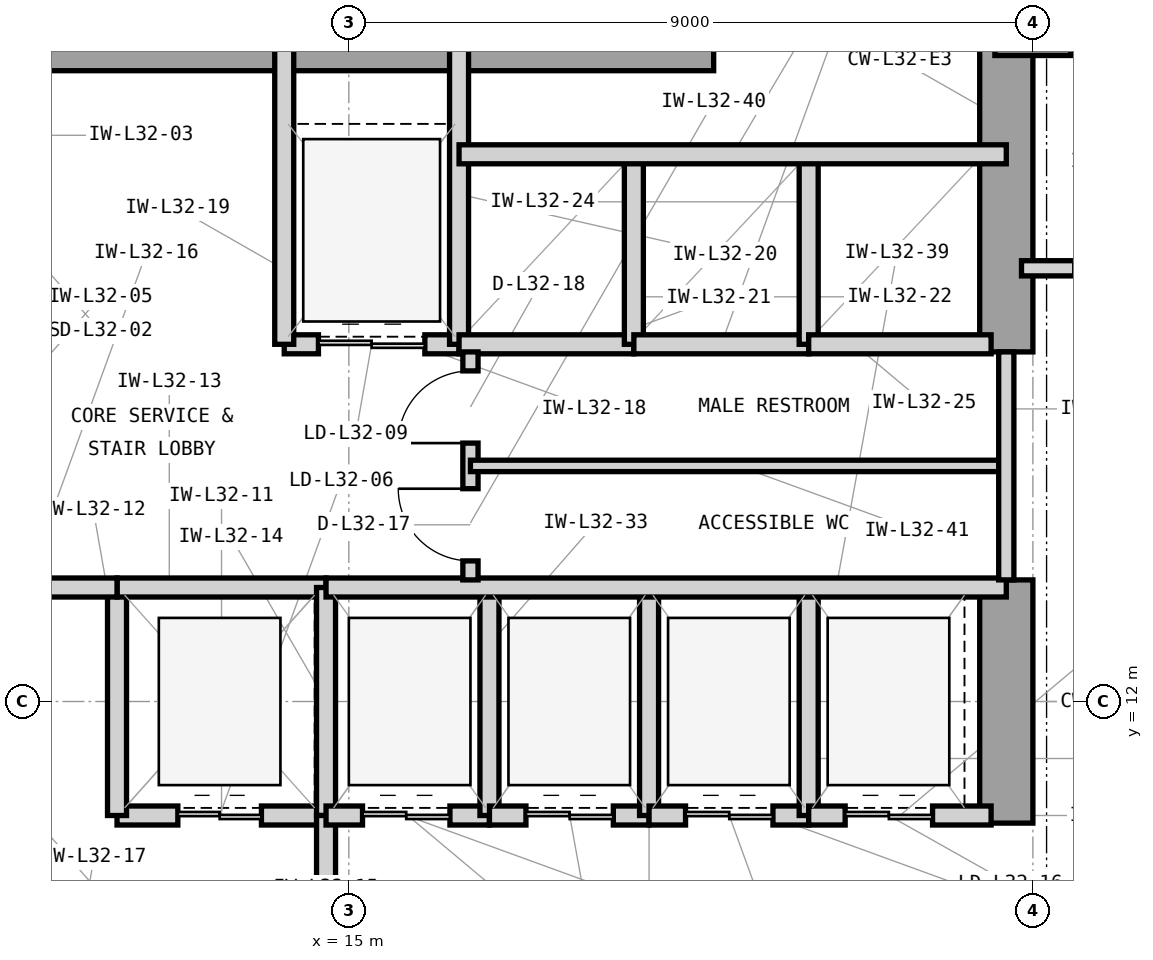
"""IFC4 building model, lengths in metres.
Left out: names, types, materials, properties, quantities, classifications, styles, units other than length and angle.
Written with IfcOpenShell. Run it as: python <this file> out.ifc"""

import sys

from ifc_helpers import new_model, si_unit, direction, frame, frame_2d, origin, origin_2d, place, context, subcontext, project, spatial, rectangle, extrude, element, fill, save


model = new_model("IFC4")
c1 = context("Model", 3, precision=1e-05, world=origin(), true_north=direction((0.0, 1.0)))
c2 = subcontext(c1, "Body", "Model", "MODEL_VIEW")
j1 = project(units=[si_unit("LENGTHUNIT", "METRE"), si_unit("PLANEANGLEUNIT", "RADIAN")], contexts=[c1])
p1 = place(None, origin())
s1 = spatial("IfcSite", under=j1, at=p1, CompositionType="ELEMENT")
p2 = place(p1, origin())
s2 = spatial("IfcBuilding", under=s1, at=p2, CompositionType="ELEMENT")
p3 = place(p2, frame((0.0, 0.0, 136.2)))
s3 = spatial("IfcBuildingStorey", under=s2, at=p3, CompositionType="ELEMENT", Elevation=136.2)
p4 = place(p3, frame((7.475, 20.65, 0.0), z_axis=(0.0, 0.0, 1.0), x_axis=(1.0, 0.0, 0.0)))
e1 = element("IfcWall", 1, at=p4, inside=s3, PredefinedType="SHEAR", context=c2, shape_type="SweptSolid", body=[
    extrude(rectangle(XDim=12.325, YDim=0.7, at=frame_2d((6.163, 0.0))), origin(), (0.0, 0.0, 1.0), 3.9),
])
p5 = place(p3, frame((23.65, 10.4, 0.0), z_axis=(0.0, 0.0, 1.0), x_axis=(0.0, 1.0, 0.0)))
e2 = element("IfcWall", 2, at=p5, inside=s3, PredefinedType="SHEAR", context=c2, shape_type="SweptSolid", body=[
    extrude(rectangle(XDim=3.2, YDim=0.7, at=frame_2d((1.6, 0.0))), origin(), (0.0, 0.0, 1.0), 3.9),
])
p6 = place(p3, frame((23.65, 16.6, 0.0), z_axis=(0.0, 0.0, 1.0), x_axis=(0.0, 1.0, 0.0)))
e3 = element("IfcWall", 3, at=p6, inside=s3, PredefinedType="SHEAR", context=c2, shape_type="SweptSolid", body=[
    extrude(rectangle(XDim=4.05, YDim=0.7, at=frame_2d((2.025, 0.0))), origin(), (0.0, 0.0, 1.0), 3.9),
])
p7 = place(p3, frame((24.0, 21.0, 0.0), z_axis=(0.0, 0.0, 1.0), x_axis=(1.0, 0.0, 0.0)))
e4 = element("IfcColumn", 4, at=p7, inside=s3, PredefinedType="COLUMN", context=c2, shape_type="SweptSolid", body=[
    extrude(rectangle(XDim=1.0, YDim=1.0, at=origin_2d()), origin(), (0.0, 0.0, 1.0), 3.9),
])
p8 = place(p3, frame((11.95, 10.5, 0.0), z_axis=(0.0, 0.0, 1.0), x_axis=(1.0, 0.0, 0.0)))
e5 = element("IfcWall", 5, at=p8, inside=s3, PredefinedType="PARTITIONING", context=c2, shape_type="SweptSolid", body=[
    extrude(rectangle(XDim=2.75, YDim=0.25, at=frame_2d((1.375, 0.0))), origin(), (0.0, 0.0, 1.0), 3.233),
])
p9 = place(p8, frame((0.8, 0.0, 0.0)))
e6 = element("IfcOpeningElement", 6, at=p9, cuts=e5, PredefinedType="OPENING", context=c2, shape_type="SweptSolid", body=[
    extrude(rectangle(XDim=1.1, YDim=2.25, at=frame_2d((0.55, 1.125))), frame((0.0, 0.135, 0.0), z_axis=(0.0, -1.0, 0.0), x_axis=(1.0, 0.0, 0.0)), (0.0, 0.0, 1.0), 0.27),
])
p10 = place(p3, frame((11.95, 10.5, 0.0), z_axis=(0.0, 0.0, 1.0), x_axis=(0.0, 1.0, 0.0)))
e7 = element("IfcWall", 7, at=p10, inside=s3, PredefinedType="PARTITIONING", context=c2, shape_type="SweptSolid", body=[
    extrude(rectangle(XDim=3.0, YDim=0.25, at=frame_2d((1.5, 0.0))), origin(), (0.0, 0.0, 1.0), 3.69),
])
p11 = place(p3, frame((11.95, 13.5, 0.0), z_axis=(0.0, 0.0, 1.0), x_axis=(1.0, 0.0, 0.0)))
e8 = element("IfcWall", 8, at=p11, inside=s3, PredefinedType="PARTITIONING", context=c2, shape_type="SweptSolid", body=[
    extrude(rectangle(XDim=2.75, YDim=0.25, at=frame_2d((1.375, 0.0))), origin(), (0.0, 0.0, 1.0), 3.233),
])
p12 = place(p3, frame((14.7, 10.5, 0.0), z_axis=(0.0, 0.0, 1.0), x_axis=(0.0, 1.0, 0.0)))
e9 = element("IfcWall", 9, at=p12, inside=s3, PredefinedType="PARTITIONING", context=c2, shape_type="SweptSolid", body=[
    extrude(rectangle(XDim=3.0, YDim=0.25, at=frame_2d((1.5, 0.0))), origin(), (0.0, 0.0, 1.0), 3.69),
])
p13 = place(p3, frame((14.7, 6.7, 0.0), z_axis=(0.0, 0.0, 1.0), x_axis=(0.0, 1.0, 0.0)))
e10 = element("IfcWall", 10, at=p13, inside=s3, PredefinedType="PARTITIONING", context=c2, shape_type="SweptSolid", body=[
    extrude(rectangle(XDim=3.8, YDim=0.25, at=frame_2d((1.9, 0.0))), origin(), (0.0, 0.0, 1.0), 3.69),
])
p14 = place(p13, frame((1.3, 0.0, 0.0)))
e11 = element("IfcOpeningElement", 11, at=p14, cuts=e10, PredefinedType="OPENING", context=c2, shape_type="SweptSolid", body=[
    extrude(rectangle(XDim=1.2, YDim=2.2, at=frame_2d((0.6, 1.1))), frame((0.0, 0.135, 0.0), z_axis=(0.0, -1.0, 0.0), x_axis=(1.0, 0.0, 0.0)), (0.0, 0.0, 1.0), 0.27),
])
p15 = place(p3, frame((10.33, 13.5, 0.0), z_axis=(0.0, 0.0, 1.0), x_axis=(1.0, 0.0, 0.0)))
e12 = element("IfcWall", 12, at=p15, inside=s3, PredefinedType="PARTITIONING", context=c2, shape_type="SweptSolid", body=[
    extrude(rectangle(XDim=1.62, YDim=0.25, at=frame_2d((0.81, 0.0))), origin(), (0.0, 0.0, 1.0), 3.233),
])
p16 = place(p3, frame((14.15, 16.7, 0.0), z_axis=(0.0, 0.0, 1.0), x_axis=(1.0, 0.0, 0.0)))
e13 = element("IfcWall", 13, at=p16, inside=s3, PredefinedType="PARTITIONING", context=c2, shape_type="SweptSolid", body=[
    extrude(rectangle(XDim=2.3, YDim=0.25, at=frame_2d((1.15, 0.0))), origin(), (0.0, 0.0, 1.0), 3.233),
])
p17 = place(p16, frame((0.45, 0.0, 0.0)))
e14 = element("IfcOpeningElement", 14, at=p17, cuts=e13, PredefinedType="OPENING", context=c2, shape_type="SweptSolid", body=[
    extrude(rectangle(XDim=1.4, YDim=2.35, at=frame_2d((0.7, 1.175))), frame((0.0, 0.135, 0.0), z_axis=(0.0, -1.0, 0.0), x_axis=(1.0, 0.0, 0.0)), (0.0, 0.0, 1.0), 0.27),
])
for number, where, z_axis, x_axis in (
    (15, (14.15, 16.7, 0.0), (0.0, 0.0, 1.0), (0.0, 1.0, 0.0)),
    (16, (16.45, 16.7, 0.0), (0.0, 0.0, 1.0), (0.0, 1.0, 0.0)),
):
    element("IfcWall", number, at=place(p3, frame(where, z_axis=z_axis, x_axis=x_axis)), inside=s3, PredefinedType="PARTITIONING", context=c2, shape_type="SweptSolid", body=[
        extrude(rectangle(XDim=3.95, YDim=0.25, at=frame_2d((1.975, 0.0))), origin(), (0.0, 0.0, 1.0), 3.69),
    ])
p18 = place(p3, frame((16.45, 16.7, 0.0), z_axis=(0.0, 0.0, 1.0), x_axis=(1.0, 0.0, 0.0)))
e17 = element("IfcWall", 17, at=p18, inside=s3, PredefinedType="PARTITIONING", context=c2, shape_type="SweptSolid", body=[
    extrude(rectangle(XDim=2.3, YDim=0.25, at=frame_2d((1.15, 0.0))), origin(), (0.0, 0.0, 1.0), 3.233),
])
p19 = place(p3, frame((18.75, 16.7, 0.0), z_axis=(0.0, 0.0, 1.0), x_axis=(0.0, 1.0, 0.0)))
e18 = element("IfcWall", 18, at=p19, inside=s3, PredefinedType="PARTITIONING", context=c2, shape_type="SweptSolid", body=[
    extrude(rectangle(XDim=2.5, YDim=0.25, at=frame_2d((1.25, 0.0))), origin(), (0.0, 0.0, 1.0), 3.69),
])
p20 = place(p3, frame((18.75, 16.7, 0.0), z_axis=(0.0, 0.0, 1.0), x_axis=(1.0, 0.0, 0.0)))
e19 = element("IfcWall", 19, at=p20, inside=s3, PredefinedType="PARTITIONING", context=c2, shape_type="SweptSolid", body=[
    extrude(rectangle(XDim=2.3, YDim=0.25, at=frame_2d((1.15, 0.0))), origin(), (0.0, 0.0, 1.0), 3.233),
])
p21 = place(p3, frame((21.05, 16.7, 0.0), z_axis=(0.0, 0.0, 1.0), x_axis=(0.0, 1.0, 0.0)))
e20 = element("IfcWall", 20, at=p21, inside=s3, PredefinedType="PARTITIONING", context=c2, shape_type="SweptSolid", body=[
    extrude(rectangle(XDim=2.5, YDim=0.25, at=frame_2d((1.25, 0.0))), origin(), (0.0, 0.0, 1.0), 3.69),
])
p22 = place(p3, frame((21.05, 16.7, 0.0), z_axis=(0.0, 0.0, 1.0), x_axis=(1.0, 0.0, 0.0)))
e21 = element("IfcWall", 21, at=p22, inside=s3, PredefinedType="PARTITIONING", context=c2, shape_type="SweptSolid", body=[
    extrude(rectangle(XDim=2.4, YDim=0.25, at=frame_2d((1.2, 0.0))), origin(), (0.0, 0.0, 1.0), 3.233),
])
p23 = place(p3, frame((16.45, 19.2, 0.0), z_axis=(0.0, 0.0, 1.0), x_axis=(1.0, 0.0, 0.0)))
e22 = element("IfcWall", 22, at=p23, inside=s3, PredefinedType="PARTITIONING", context=c2, shape_type="SweptSolid", body=[
    extrude(rectangle(XDim=7.2, YDim=0.25, at=frame_2d((3.6, 0.0))), origin(), (0.0, 0.0, 1.0), 3.69),
])
p24 = place(p3, frame((14.7, 10.5, 0.0), z_axis=(0.0, 0.0, 1.0), x_axis=(1.0, 0.0, 0.0)))
e23 = element("IfcWall", 23, at=p24, inside=s3, PredefinedType="PARTITIONING", context=c2, shape_type="SweptSolid", body=[
    extrude(rectangle(XDim=2.15, YDim=0.25, at=frame_2d((1.075, 0.0))), origin(), (0.0, 0.0, 1.0), 3.233),
])
p25 = place(p24, frame((0.48, 0.0, 0.0)))
e24 = element("IfcOpeningElement", 24, at=p25, cuts=e23, PredefinedType="OPENING", context=c2, shape_type="SweptSolid", body=[
    extrude(rectangle(XDim=1.15, YDim=2.25, at=frame_2d((0.575, 1.125))), frame((0.0, 0.135, 0.0), z_axis=(0.0, -1.0, 0.0), x_axis=(1.0, 0.0, 0.0)), (0.0, 0.0, 1.0), 0.27),
])
p26 = place(p3, frame((16.85, 10.5, 0.0), z_axis=(0.0, 0.0, 1.0), x_axis=(0.0, 1.0, 0.0)))
e25 = element("IfcWall", 25, at=p26, inside=s3, PredefinedType="PARTITIONING", context=c2, shape_type="SweptSolid", body=[
    extrude(rectangle(XDim=3.0, YDim=0.25, at=frame_2d((1.5, 0.0))), origin(), (0.0, 0.0, 1.0), 3.69),
])
p27 = place(p3, frame((16.85, 10.5, 0.0), z_axis=(0.0, 0.0, 1.0), x_axis=(1.0, 0.0, 0.0)))
e26 = element("IfcWall", 26, at=p27, inside=s3, PredefinedType="PARTITIONING", context=c2, shape_type="SweptSolid", body=[
    extrude(rectangle(XDim=2.1, YDim=0.25, at=frame_2d((1.05, 0.0))), origin(), (0.0, 0.0, 1.0), 3.233),
])
p28 = place(p27, frame((0.48, 0.0, 0.0)))
e27 = element("IfcOpeningElement", 27, at=p28, cuts=e26, PredefinedType="OPENING", context=c2, shape_type="SweptSolid", body=[
    extrude(rectangle(XDim=1.15, YDim=2.25, at=frame_2d((0.575, 1.125))), frame((0.0, 0.135, 0.0), z_axis=(0.0, -1.0, 0.0), x_axis=(1.0, 0.0, 0.0)), (0.0, 0.0, 1.0), 0.27),
])
p29 = place(p3, frame((18.95, 10.5, 0.0), z_axis=(0.0, 0.0, 1.0), x_axis=(0.0, 1.0, 0.0)))
e28 = element("IfcWall", 28, at=p29, inside=s3, PredefinedType="PARTITIONING", context=c2, shape_type="SweptSolid", body=[
    extrude(rectangle(XDim=3.0, YDim=0.25, at=frame_2d((1.5, 0.0))), origin(), (0.0, 0.0, 1.0), 3.69),
])
p30 = place(p3, frame((18.95, 10.5, 0.0), z_axis=(0.0, 0.0, 1.0), x_axis=(1.0, 0.0, 0.0)))
e29 = element("IfcWall", 29, at=p30, inside=s3, PredefinedType="PARTITIONING", context=c2, shape_type="SweptSolid", body=[
    extrude(rectangle(XDim=2.1, YDim=0.25, at=frame_2d((1.05, 0.0))), origin(), (0.0, 0.0, 1.0), 3.233),
])
p31 = place(p30, frame((0.48, 0.0, 0.0)))
e30 = element("IfcOpeningElement", 30, at=p31, cuts=e29, PredefinedType="OPENING", context=c2, shape_type="SweptSolid", body=[
    extrude(rectangle(XDim=1.15, YDim=2.25, at=frame_2d((0.575, 1.125))), frame((0.0, 0.135, 0.0), z_axis=(0.0, -1.0, 0.0), x_axis=(1.0, 0.0, 0.0)), (0.0, 0.0, 1.0), 0.27),
])
p32 = place(p3, frame((21.05, 10.5, 0.0), z_axis=(0.0, 0.0, 1.0), x_axis=(0.0, 1.0, 0.0)))
e31 = element("IfcWall", 31, at=p32, inside=s3, PredefinedType="PARTITIONING", context=c2, shape_type="SweptSolid", body=[
    extrude(rectangle(XDim=3.0, YDim=0.25, at=frame_2d((1.5, 0.0))), origin(), (0.0, 0.0, 1.0), 3.69),
])
p33 = place(p3, frame((21.05, 10.5, 0.0), z_axis=(0.0, 0.0, 1.0), x_axis=(1.0, 0.0, 0.0)))
e32 = element("IfcWall", 32, at=p33, inside=s3, PredefinedType="PARTITIONING", context=c2, shape_type="SweptSolid", body=[
    extrude(rectangle(XDim=2.4, YDim=0.25, at=frame_2d((1.2, 0.0))), origin(), (0.0, 0.0, 1.0), 3.233),
])
p34 = place(p33, frame((0.48, 0.0, 0.0)))
e33 = element("IfcOpeningElement", 33, at=p34, cuts=e32, PredefinedType="OPENING", context=c2, shape_type="SweptSolid", body=[
    extrude(rectangle(XDim=1.15, YDim=2.25, at=frame_2d((0.575, 1.125))), frame((0.0, 0.135, 0.0), z_axis=(0.0, -1.0, 0.0), x_axis=(1.0, 0.0, 0.0)), (0.0, 0.0, 1.0), 0.27),
])
p35 = place(p3, frame((14.7, 13.5, 0.0), z_axis=(0.0, 0.0, 1.0), x_axis=(1.0, 0.0, 0.0)))
e34 = element("IfcWall", 34, at=p35, inside=s3, PredefinedType="PARTITIONING", context=c2, shape_type="SweptSolid", body=[
    extrude(rectangle(XDim=8.95, YDim=0.25, at=frame_2d((4.475, 0.0))), origin(), (0.0, 0.0, 1.0), 3.233),
])
p36 = place(p3, frame((16.6, 13.6, 0.0), z_axis=(0.0, 0.0, 1.0), x_axis=(0.0, 1.0, 0.0)))
e35 = element("IfcWall", 35, at=p36, inside=s3, PredefinedType="PARTITIONING", context=c2, shape_type="SweptSolid", body=[
    extrude(rectangle(XDim=3.0, YDim=0.2, at=frame_2d((1.5, 0.0))), origin(), (0.0, 0.0, 1.0), 3.69),
])
p37 = place(p36, frame((0.25, 0.0, 0.0)))
e36 = element("IfcOpeningElement", 36, at=p37, cuts=e35, PredefinedType="OPENING", context=c2, shape_type="SweptSolid", body=[
    extrude(rectangle(XDim=0.95, YDim=2.1, at=frame_2d((0.475, 1.05))), frame((0.0, 0.11, 0.0), z_axis=(0.0, -1.0, 0.0), x_axis=(1.0, 0.0, 0.0)), (0.0, 0.0, 1.0), 0.22),
])
p38 = place(p36, frame((1.8, 0.0, 0.0)))
e37 = element("IfcOpeningElement", 37, at=p38, cuts=e35, PredefinedType="OPENING", context=c2, shape_type="SweptSolid", body=[
    extrude(rectangle(XDim=0.95, YDim=2.1, at=frame_2d((0.475, 1.05))), frame((0.0, 0.11, 0.0), z_axis=(0.0, -1.0, 0.0), x_axis=(1.0, 0.0, 0.0)), (0.0, 0.0, 1.0), 0.22),
])
p39 = place(p3, frame((16.6, 15.1, 0.0), z_axis=(0.0, 0.0, 1.0), x_axis=(1.0, 0.0, 0.0)))
e38 = element("IfcWall", 38, at=p39, inside=s3, PredefinedType="PARTITIONING", context=c2, shape_type="SweptSolid", body=[
    extrude(rectangle(XDim=7.05, YDim=0.15, at=frame_2d((3.525, 0.0))), origin(), (0.0, 0.0, 1.0), 3.69),
])
p40 = place(p3, frame((23.65, 13.6, 0.0), z_axis=(0.0, 0.0, 1.0), x_axis=(0.0, 1.0, 0.0)))
e39 = element("IfcWall", 39, at=p40, inside=s3, PredefinedType="PARTITIONING", context=c2, shape_type="SweptSolid", body=[
    extrude(rectangle(XDim=3.0, YDim=0.2, at=frame_2d((1.5, 0.0))), origin(), (0.0, 0.0, 1.0), 3.69),
])
p41 = place(p3, frame((23.85, 17.7, 0.0), z_axis=(0.0, 0.0, 1.0), x_axis=(1.0, 0.0, 0.0)))
e40 = element("IfcWall", 40, at=p41, inside=s3, PredefinedType="PARTITIONING", context=c2, shape_type="SweptSolid", body=[
    extrude(rectangle(XDim=2.85, YDim=0.2, at=frame_2d((1.425, 0.0))), origin(), (0.0, 0.0, 1.0), 3.69),
])
p42 = place(p41, frame((0.7, 0.0, 0.0)))
e41 = element("IfcOpeningElement", 41, at=p42, cuts=e40, PredefinedType="OPENING", context=c2, shape_type="SweptSolid", body=[
    extrude(rectangle(XDim=1.0, YDim=2.15, at=frame_2d((0.5, 1.075))), frame((0.0, 0.11, 0.0), z_axis=(0.0, -1.0, 0.0), x_axis=(1.0, 0.0, 0.0)), (0.0, 0.0, 1.0), 0.22),
])
p43 = place(p9, origin())
e42 = element("IfcDoor", 42, at=p43, inside=s3, OperationType="DOUBLE_DOOR_SLIDING", PredefinedType="DOOR", context=c2, shape_type="SweptSolid", body=[
    extrude(rectangle(XDim=1.1, YDim=2.25, at=frame_2d((0.55, 1.125))), frame((0.0, 0.025, 0.0), z_axis=(0.0, -1.0, 0.0), x_axis=(1.0, 0.0, 0.0)), (0.0, 0.0, 1.0), 0.05),
])
fill(e6, e42)
p44 = place(p17, origin())
e43 = element("IfcDoor", 43, at=p44, inside=s3, OperationType="DOUBLE_DOOR_SLIDING", PredefinedType="DOOR", context=c2, shape_type="SweptSolid", body=[
    extrude(rectangle(XDim=1.4, YDim=2.35, at=frame_2d((0.7, 1.175))), frame((0.0, 0.025, 0.0), z_axis=(0.0, -1.0, 0.0), x_axis=(1.0, 0.0, 0.0)), (0.0, 0.0, 1.0), 0.05),
])
fill(e14, e43)
p45 = place(p25, origin())
e44 = element("IfcDoor", 44, at=p45, inside=s3, OperationType="DOUBLE_DOOR_SLIDING", PredefinedType="DOOR", context=c2, shape_type="SweptSolid", body=[
    extrude(rectangle(XDim=1.15, YDim=2.25, at=frame_2d((0.575, 1.125))), frame((0.0, 0.025, 0.0), z_axis=(0.0, -1.0, 0.0), x_axis=(1.0, 0.0, 0.0)), (0.0, 0.0, 1.0), 0.05),
])
fill(e24, e44)
p46 = place(p28, origin())
e45 = element("IfcDoor", 45, at=p46, inside=s3, OperationType="DOUBLE_DOOR_SLIDING", PredefinedType="DOOR", context=c2, shape_type="SweptSolid", body=[
    extrude(rectangle(XDim=1.15, YDim=2.25, at=frame_2d((0.575, 1.125))), frame((0.0, 0.025, 0.0), z_axis=(0.0, -1.0, 0.0), x_axis=(1.0, 0.0, 0.0)), (0.0, 0.0, 1.0), 0.05),
])
fill(e27, e45)
p47 = place(p31, origin())
e46 = element("IfcDoor", 46, at=p47, inside=s3, OperationType="DOUBLE_DOOR_SLIDING", PredefinedType="DOOR", context=c2, shape_type="SweptSolid", body=[
    extrude(rectangle(XDim=1.15, YDim=2.25, at=frame_2d((0.575, 1.125))), frame((0.0, 0.025, 0.0), z_axis=(0.0, -1.0, 0.0), x_axis=(1.0, 0.0, 0.0)), (0.0, 0.0, 1.0), 0.05),
])
fill(e30, e46)
p48 = place(p34, origin())
e47 = element("IfcDoor", 47, at=p48, inside=s3, OperationType="DOUBLE_DOOR_SLIDING", PredefinedType="DOOR", context=c2, shape_type="SweptSolid", body=[
    extrude(rectangle(XDim=1.15, YDim=2.25, at=frame_2d((0.575, 1.125))), frame((0.0, 0.025, 0.0), z_axis=(0.0, -1.0, 0.0), x_axis=(1.0, 0.0, 0.0)), (0.0, 0.0, 1.0), 0.05),
])
fill(e33, e47)
p49 = place(p37, origin())
e48 = element("IfcDoor", 48, at=p49, inside=s3, OperationType="SINGLE_SWING_RIGHT", PredefinedType="DOOR", context=c2, shape_type="SweptSolid", body=[
    extrude(rectangle(XDim=0.95, YDim=2.1, at=frame_2d((0.475, 1.05))), frame((0.0, 0.025, 0.0), z_axis=(0.0, -1.0, 0.0), x_axis=(1.0, 0.0, 0.0)), (0.0, 0.0, 1.0), 0.05),
])
fill(e36, e48)
p50 = place(p38, origin())
e49 = element("IfcDoor", 49, at=p50, inside=s3, OperationType="SINGLE_SWING_LEFT", PredefinedType="DOOR", context=c2, shape_type="SweptSolid", body=[
    extrude(rectangle(XDim=0.95, YDim=2.1, at=frame_2d((0.475, 1.05))), frame((0.0, 0.025, 0.0), z_axis=(0.0, -1.0, 0.0), x_axis=(1.0, 0.0, 0.0)), (0.0, 0.0, 1.0), 0.05),
])
fill(e37, e49)
save(model, sys.argv[1])
